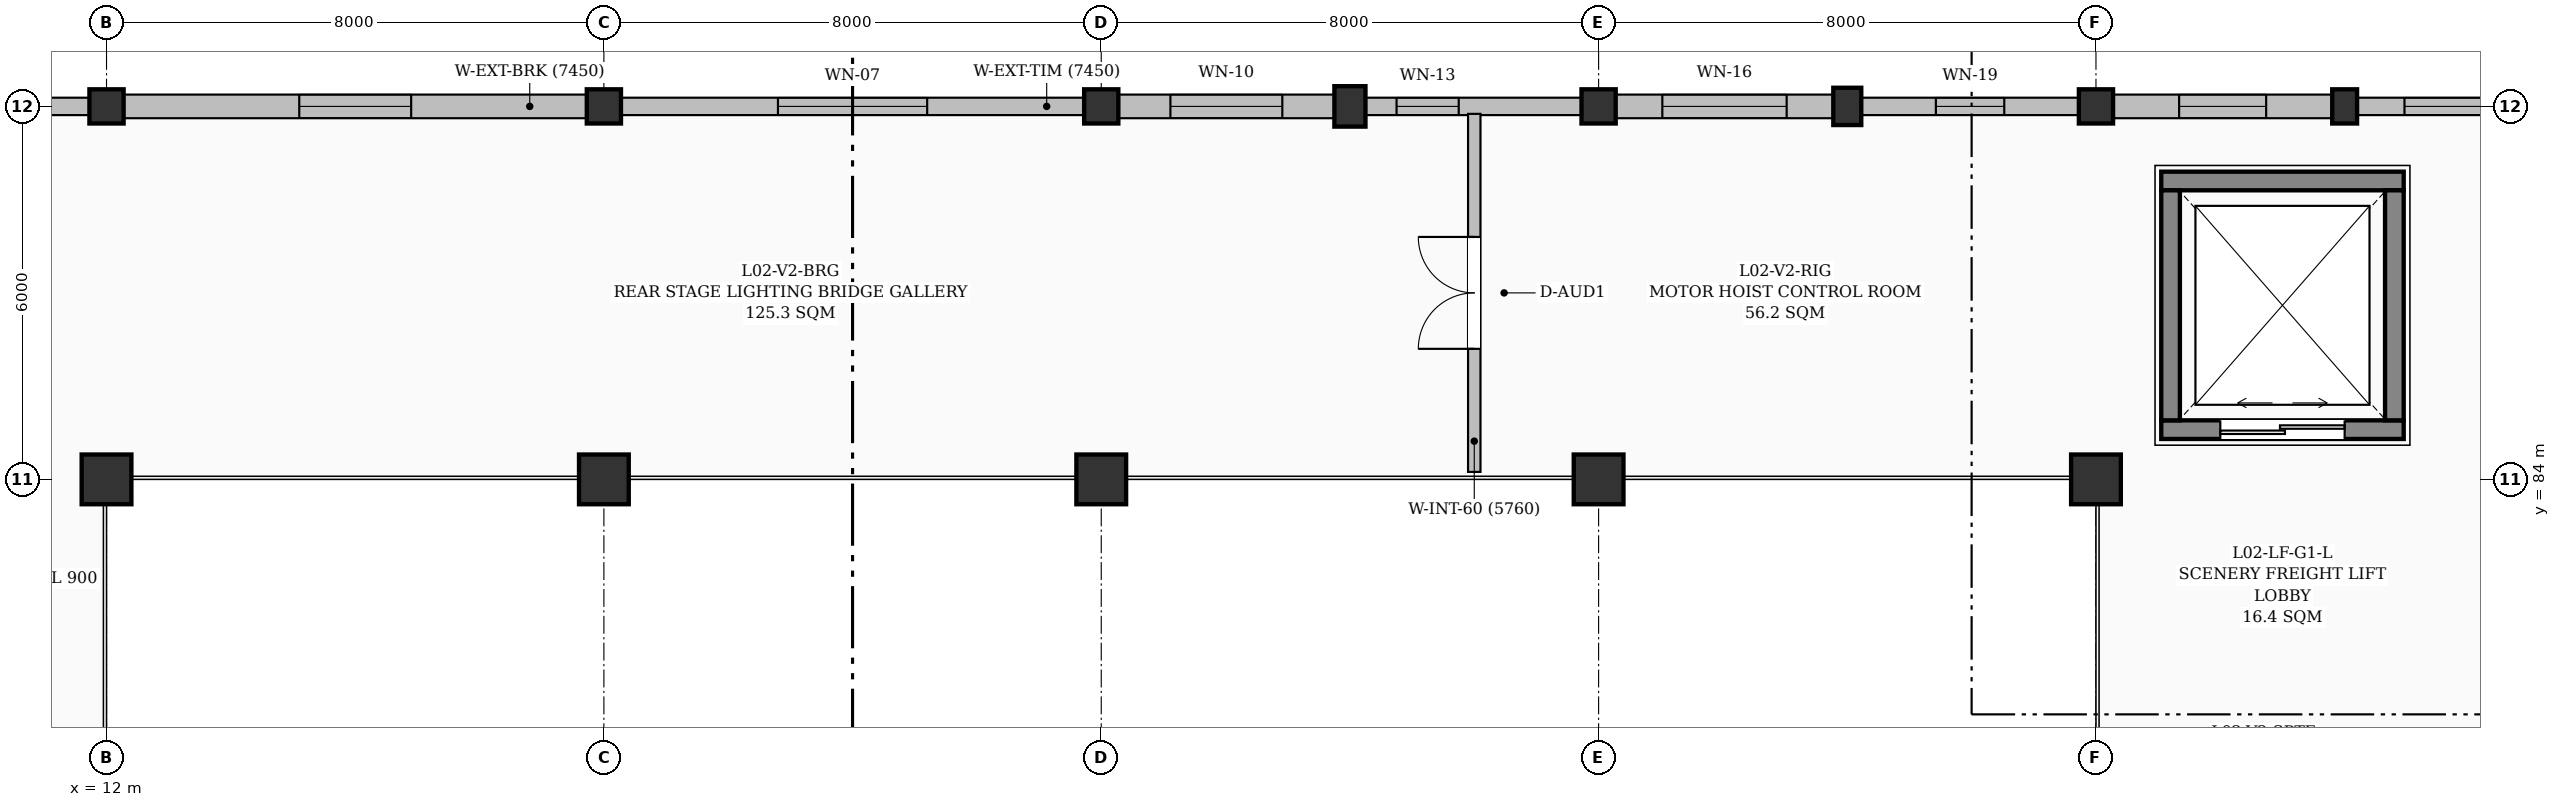
"""IFC4 building model, lengths in metres.
Left out: names, types, materials, properties, quantities, classifications, styles, units other than length and angle.
Written with IfcOpenShell. Run it as: python <this file> out.ifc"""

import sys

from ifc_helpers import new_model, si_unit, direction, frame, frame_2d, origin, origin_2d, place, context, subcontext, project, spatial, rectangle, extrude, element, fill, save


model = new_model("IFC4")
c1 = context("Model", 3, precision=1e-05, world=origin(), true_north=direction((0.0, 1.0)))
c2 = subcontext(c1, "Body", "Model", "MODEL_VIEW")
j1 = project(units=[si_unit("LENGTHUNIT", "METRE"), si_unit("PLANEANGLEUNIT", "RADIAN")], contexts=[c1])
p1 = place(None, origin())
s1 = spatial("IfcSite", under=j1, at=p1, CompositionType="ELEMENT")
p2 = place(p1, origin())
s2 = spatial("IfcBuilding", under=s1, at=p2, CompositionType="ELEMENT")
p3 = place(p2, frame((0.0, 0.0, 9.3)))
s3 = spatial("IfcBuildingStorey", under=s2, at=p3, CompositionType="ELEMENT", Elevation=9.3)
p4 = place(p3, frame((12.0, 84.0, 0.0), z_axis=(0.0, 0.0, 1.0), x_axis=(1.0, 0.0, 0.0)))
e1 = element("IfcColumn", 1, at=p4, inside=s3, PredefinedType="COLUMN", context=c2, shape_type="SweptSolid", body=[
    extrude(rectangle(XDim=0.8, YDim=0.8, at=origin_2d()), origin(), (0.0, 0.0, 1.0), 4.5),
])
p5 = place(p3, frame((12.0, 90.0, 0.0), z_axis=(0.0, 0.0, 1.0), x_axis=(1.0, 0.0, 0.0)))
e2 = element("IfcColumn", 2, at=p5, inside=s3, PredefinedType="COLUMN", context=c2, shape_type="SweptSolid", body=[
    extrude(rectangle(XDim=0.55, YDim=0.55, at=origin_2d()), origin(), (0.0, 0.0, 1.0), 4.5),
])
p6 = place(p3, frame((20.0, 84.0, 0.0), z_axis=(0.0, 0.0, 1.0), x_axis=(1.0, 0.0, 0.0)))
e3 = element("IfcColumn", 3, at=p6, inside=s3, PredefinedType="COLUMN", context=c2, shape_type="SweptSolid", body=[
    extrude(rectangle(XDim=0.8, YDim=0.8, at=origin_2d()), origin(), (0.0, 0.0, 1.0), 4.5),
])
p7 = place(p3, frame((20.0, 90.0, 0.0), z_axis=(0.0, 0.0, 1.0), x_axis=(1.0, 0.0, 0.0)))
e4 = element("IfcColumn", 4, at=p7, inside=s3, PredefinedType="COLUMN", context=c2, shape_type="SweptSolid", body=[
    extrude(rectangle(XDim=0.55, YDim=0.55, at=origin_2d()), origin(), (0.0, 0.0, 1.0), 4.5),
])
p8 = place(p3, frame((28.0, 84.0, 0.0), z_axis=(0.0, 0.0, 1.0), x_axis=(1.0, 0.0, 0.0)))
e5 = element("IfcColumn", 5, at=p8, inside=s3, PredefinedType="COLUMN", context=c2, shape_type="SweptSolid", body=[
    extrude(rectangle(XDim=0.8, YDim=0.8, at=origin_2d()), origin(), (0.0, 0.0, 1.0), 4.5),
])
p9 = place(p3, frame((28.0, 90.0, 0.0), z_axis=(0.0, 0.0, 1.0), x_axis=(1.0, 0.0, 0.0)))
e6 = element("IfcColumn", 6, at=p9, inside=s3, PredefinedType="COLUMN", context=c2, shape_type="SweptSolid", body=[
    extrude(rectangle(XDim=0.55, YDim=0.55, at=origin_2d()), origin(), (0.0, 0.0, 1.0), 4.5),
])
p10 = place(p3, frame((32.0, 90.0, 0.0), z_axis=(0.0, 0.0, 1.0), x_axis=(1.0, 0.0, 0.0)))
e7 = element("IfcColumn", 7, at=p10, inside=s3, PredefinedType="PILASTER", context=c2, shape_type="SweptSolid", body=[
    extrude(rectangle(XDim=0.5, YDim=0.65, at=origin_2d()), origin(), (0.0, 0.0, 1.0), 4.5),
])
p11 = place(p3, frame((36.0, 84.0, 0.0), z_axis=(0.0, 0.0, 1.0), x_axis=(1.0, 0.0, 0.0)))
e8 = element("IfcColumn", 8, at=p11, inside=s3, PredefinedType="COLUMN", context=c2, shape_type="SweptSolid", body=[
    extrude(rectangle(XDim=0.8, YDim=0.8, at=origin_2d()), origin(), (0.0, 0.0, 1.0), 4.5),
])
p12 = place(p3, frame((36.0, 90.0, 0.0), z_axis=(0.0, 0.0, 1.0), x_axis=(1.0, 0.0, 0.0)))
e9 = element("IfcColumn", 9, at=p12, inside=s3, PredefinedType="COLUMN", context=c2, shape_type="SweptSolid", body=[
    extrude(rectangle(XDim=0.55, YDim=0.55, at=origin_2d()), origin(), (0.0, 0.0, 1.0), 4.5),
])
p13 = place(p3, frame((40.0, 90.0, 0.0), z_axis=(0.0, 0.0, 1.0), x_axis=(1.0, 0.0, 0.0)))
e10 = element("IfcColumn", 10, at=p13, inside=s3, PredefinedType="PILASTER", context=c2, shape_type="SweptSolid", body=[
    extrude(rectangle(XDim=0.45, YDim=0.6, at=origin_2d()), origin(), (0.0, 0.0, 1.0), 4.5),
])
p14 = place(p3, frame((44.0, 84.0, 0.0), z_axis=(0.0, 0.0, 1.0), x_axis=(1.0, 0.0, 0.0)))
e11 = element("IfcColumn", 11, at=p14, inside=s3, PredefinedType="COLUMN", context=c2, shape_type="SweptSolid", body=[
    extrude(rectangle(XDim=0.8, YDim=0.8, at=origin_2d()), origin(), (0.0, 0.0, 1.0), 4.5),
])
p15 = place(p3, frame((44.0, 90.0, 0.0), z_axis=(0.0, 0.0, 1.0), x_axis=(1.0, 0.0, 0.0)))
e12 = element("IfcColumn", 12, at=p15, inside=s3, PredefinedType="COLUMN", context=c2, shape_type="SweptSolid", body=[
    extrude(rectangle(XDim=0.55, YDim=0.55, at=origin_2d()), origin(), (0.0, 0.0, 1.0), 4.5),
])
p16 = place(p3, frame((48.0, 90.0, 0.0), z_axis=(0.0, 0.0, 1.0), x_axis=(1.0, 0.0, 0.0)))
e13 = element("IfcColumn", 13, at=p16, inside=s3, PredefinedType="PILASTER", context=c2, shape_type="SweptSolid", body=[
    extrude(rectangle(XDim=0.4, YDim=0.55, at=origin_2d()), origin(), (0.0, 0.0, 1.0), 4.5),
])
p17 = place(p3, frame((8.25, 90.0, 0.0), z_axis=(0.0, 0.0, 1.0), x_axis=(1.0, 0.0, 0.0)))
e14 = element("IfcWall", 14, at=p17, inside=s3, PredefinedType="SOLIDWALL", context=c2, shape_type="SweptSolid", body=[
    extrude(rectangle(XDim=3.475, YDim=0.28, at=frame_2d((1.738, 0.0))), origin(), (0.0, 0.0, 1.0), 3.755),
])
p18 = place(p17, frame((1.137, 0.0, 0.95)))
e15 = element("IfcOpeningElement", 15, at=p18, cuts=e14, PredefinedType="OPENING", context=c2, shape_type="SweptSolid", body=[
    extrude(rectangle(XDim=1.2, YDim=1.8, at=frame_2d((0.6, 0.9))), frame((0.0, 0.15, 0.0), z_axis=(0.0, -1.0, 0.0), x_axis=(1.0, 0.0, 0.0)), (0.0, 0.0, 1.0), 0.3),
])
p19 = place(p3, frame((12.275, 90.0, 0.0), z_axis=(0.0, 0.0, 1.0), x_axis=(1.0, 0.0, 0.0)))
e16 = element("IfcWall", 16, at=p19, inside=s3, PredefinedType="SOLIDWALL", context=c2, shape_type="SweptSolid", body=[
    extrude(rectangle(XDim=7.45, YDim=0.38, at=frame_2d((3.725, 0.0))), origin(), (0.0, 0.0, 1.0), 3.705),
])
p20 = place(p19, frame((2.825, 0.0, 0.95)))
e17 = element("IfcOpeningElement", 17, at=p20, cuts=e16, PredefinedType="OPENING", context=c2, shape_type="SweptSolid", body=[
    extrude(rectangle(XDim=1.8, YDim=1.8, at=frame_2d((0.9, 0.9))), frame((0.0, 0.2, 0.0), z_axis=(0.0, -1.0, 0.0), x_axis=(1.0, 0.0, 0.0)), (0.0, 0.0, 1.0), 0.4),
])
p21 = place(p3, frame((20.275, 90.0, 0.0), z_axis=(0.0, 0.0, 1.0), x_axis=(1.0, 0.0, 0.0)))
e18 = element("IfcWall", 18, at=p21, inside=s3, PredefinedType="SOLIDWALL", context=c2, shape_type="SweptSolid", body=[
    extrude(rectangle(XDim=7.45, YDim=0.28, at=frame_2d((3.725, 0.0))), origin(), (0.0, 0.0, 1.0), 3.655),
])
p22 = place(p21, frame((2.525, 0.0, 0.95)))
e19 = element("IfcOpeningElement", 19, at=p22, cuts=e18, PredefinedType="OPENING", context=c2, shape_type="SweptSolid", body=[
    extrude(rectangle(XDim=2.4, YDim=1.8, at=frame_2d((1.2, 0.9))), frame((0.0, 0.15, 0.0), z_axis=(0.0, -1.0, 0.0), x_axis=(1.0, 0.0, 0.0)), (0.0, 0.0, 1.0), 0.3),
])
p23 = place(p3, frame((28.275, 90.0, 0.0), z_axis=(0.0, 0.0, 1.0), x_axis=(1.0, 0.0, 0.0)))
e20 = element("IfcWall", 20, at=p23, inside=s3, PredefinedType="SOLIDWALL", context=c2, shape_type="SweptSolid", body=[
    extrude(rectangle(XDim=3.475, YDim=0.38, at=frame_2d((1.738, 0.0))), origin(), (0.0, 0.0, 1.0), 3.955),
])
p24 = place(p23, frame((0.837, 0.0, 0.95)))
e21 = element("IfcOpeningElement", 21, at=p24, cuts=e20, PredefinedType="OPENING", context=c2, shape_type="SweptSolid", body=[
    extrude(rectangle(XDim=1.8, YDim=1.5, at=frame_2d((0.9, 0.75))), frame((0.0, 0.2, 0.0), z_axis=(0.0, -1.0, 0.0), x_axis=(1.0, 0.0, 0.0)), (0.0, 0.0, 1.0), 0.4),
])
p25 = place(p3, frame((32.25, 90.0, 0.0), z_axis=(0.0, 0.0, 1.0), x_axis=(1.0, 0.0, 0.0)))
e22 = element("IfcWall", 22, at=p25, inside=s3, PredefinedType="SOLIDWALL", context=c2, shape_type="SweptSolid", body=[
    extrude(rectangle(XDim=3.475, YDim=0.28, at=frame_2d((1.738, 0.0))), origin(), (0.0, 0.0, 1.0), 3.955),
])
p26 = place(p25, frame((0.5, 0.0, 0.95)))
e23 = element("IfcOpeningElement", 23, at=p26, cuts=e22, PredefinedType="OPENING", context=c2, shape_type="SweptSolid", body=[
    extrude(rectangle(XDim=1.0, YDim=1.4, at=frame_2d((0.5, 0.7))), frame((0.0, 0.15, 0.0), z_axis=(0.0, -1.0, 0.0), x_axis=(1.0, 0.0, 0.0)), (0.0, 0.0, 1.0), 0.3),
])
p27 = place(p3, frame((36.275, 90.0, 0.0), z_axis=(0.0, 0.0, 1.0), x_axis=(1.0, 0.0, 0.0)))
e24 = element("IfcWall", 24, at=p27, inside=s3, PredefinedType="SOLIDWALL", context=c2, shape_type="SweptSolid", body=[
    extrude(rectangle(XDim=3.5, YDim=0.38, at=frame_2d((1.75, 0.0))), origin(), (0.0, 0.0, 1.0), 3.755),
])
p28 = place(p27, frame((0.75, 0.0, 0.95)))
e25 = element("IfcOpeningElement", 25, at=p28, cuts=e24, PredefinedType="OPENING", context=c2, shape_type="SweptSolid", body=[
    extrude(rectangle(XDim=2.0, YDim=1.2, at=frame_2d((1.0, 0.6))), frame((0.0, 0.2, 0.0), z_axis=(0.0, -1.0, 0.0), x_axis=(1.0, 0.0, 0.0)), (0.0, 0.0, 1.0), 0.4),
])
p29 = place(p3, frame((40.225, 90.0, 0.0), z_axis=(0.0, 0.0, 1.0), x_axis=(1.0, 0.0, 0.0)))
e26 = element("IfcWall", 26, at=p29, inside=s3, PredefinedType="SOLIDWALL", context=c2, shape_type="SweptSolid", body=[
    extrude(rectangle(XDim=3.5, YDim=0.28, at=frame_2d((1.75, 0.0))), origin(), (0.0, 0.0, 1.0), 3.755),
])
p30 = place(p29, frame((1.2, 0.0, 0.95)))
e27 = element("IfcOpeningElement", 27, at=p30, cuts=e26, PredefinedType="OPENING", context=c2, shape_type="SweptSolid", body=[
    extrude(rectangle(XDim=1.1, YDim=2.0, at=frame_2d((0.55, 1.0))), frame((0.0, 0.15, 0.0), z_axis=(0.0, -1.0, 0.0), x_axis=(1.0, 0.0, 0.0)), (0.0, 0.0, 1.0), 0.3),
])
p31 = place(p3, frame((44.275, 90.0, 0.0), z_axis=(0.0, 0.0, 1.0), x_axis=(1.0, 0.0, 0.0)))
e28 = element("IfcWall", 28, at=p31, inside=s3, PredefinedType="SOLIDWALL", context=c2, shape_type="SweptSolid", body=[
    extrude(rectangle(XDim=3.525, YDim=0.38, at=frame_2d((1.763, 0.0))), origin(), (0.0, 0.0, 1.0), 4.27),
])
p32 = place(p31, frame((1.062, 0.0, 0.95)))
e29 = element("IfcOpeningElement", 29, at=p32, cuts=e28, PredefinedType="OPENING", context=c2, shape_type="SweptSolid", body=[
    extrude(rectangle(XDim=1.4, YDim=1.8, at=frame_2d((0.7, 0.9))), frame((0.0, 0.2, 0.0), z_axis=(0.0, -1.0, 0.0), x_axis=(1.0, 0.0, 0.0)), (0.0, 0.0, 1.0), 0.4),
])
p33 = place(p3, frame((48.2, 90.0, 0.0), z_axis=(0.0, 0.0, 1.0), x_axis=(1.0, 0.0, 0.0)))
e30 = element("IfcWall", 30, at=p33, inside=s3, PredefinedType="SOLIDWALL", context=c2, shape_type="SweptSolid", body=[
    extrude(rectangle(XDim=3.525, YDim=0.28, at=frame_2d((1.763, 0.0))), origin(), (0.0, 0.0, 1.0), 4.27),
])
p34 = place(p33, frame((0.762, 0.0, 0.95)))
e31 = element("IfcOpeningElement", 31, at=p34, cuts=e30, PredefinedType="OPENING", context=c2, shape_type="SweptSolid", body=[
    extrude(rectangle(XDim=2.0, YDim=1.8, at=frame_2d((1.0, 0.9))), frame((0.0, 0.15, 0.0), z_axis=(0.0, -1.0, 0.0), x_axis=(1.0, 0.0, 0.0)), (0.0, 0.0, 1.0), 0.3),
])
p35 = place(p3, frame((45.05, 84.8, 0.0), z_axis=(0.0, 0.0, 1.0), x_axis=(1.0, 0.0, 0.0)))
e32 = element("IfcWall", 32, at=p35, inside=s3, PredefinedType="SHEAR", context=c2, shape_type="SweptSolid", body=[
    extrude(rectangle(XDim=3.9, YDim=0.3, at=frame_2d((1.95, 0.0))), origin(), (0.0, 0.0, 1.0), 4.27),
])
p36 = place(p35, frame((0.95, 0.0, 0.0)))
e33 = element("IfcOpeningElement", 33, at=p36, cuts=e32, PredefinedType="OPENING", context=c2, shape_type="SweptSolid", body=[
    extrude(rectangle(XDim=2.0, YDim=2.4, at=frame_2d((1.0, 1.2))), frame((0.0, 0.16, 0.0), z_axis=(0.0, -1.0, 0.0), x_axis=(1.0, 0.0, 0.0)), (0.0, 0.0, 1.0), 0.32),
])
p37 = place(p3, frame((48.95, 88.8, 0.0), z_axis=(0.0, 0.0, 1.0), x_axis=(-1.0, 0.0, 0.0)))
e34 = element("IfcWall", 34, at=p37, inside=s3, PredefinedType="SHEAR", context=c2, shape_type="SweptSolid", body=[
    extrude(rectangle(XDim=3.9, YDim=0.3, at=frame_2d((1.95, 0.0))), origin(), (0.0, 0.0, 1.0), 4.27),
])
for number, where, z_axis, x_axis in (
    (35, (45.2, 84.95, 0.0), (0.0, 0.0, 1.0), (0.0, 1.0, 0.0)),
    (36, (48.8, 88.65, 0.0), (0.0, 0.0, 1.0), (0.0, -1.0, 0.0)),
):
    element("IfcWall", number, at=place(p3, frame(where, z_axis=z_axis, x_axis=x_axis)), inside=s3, PredefinedType="SHEAR", context=c2, shape_type="SweptSolid", body=[
        extrude(rectangle(XDim=3.7, YDim=0.3, at=frame_2d((1.85, 0.0))), origin(), (0.0, 0.0, 1.0), 4.27),
    ])
p38 = place(p3, frame((34.0, 84.12, 0.0), z_axis=(0.0, 0.0, 1.0), x_axis=(0.0, 1.0, 0.0)))
e37 = element("IfcWall", 37, at=p38, inside=s3, PredefinedType="PARTITIONING", context=c2, shape_type="SweptSolid", body=[
    extrude(rectangle(XDim=5.76, YDim=0.2, at=frame_2d((2.88, 0.0))), origin(), (0.0, 0.0, 1.0), 4.27),
])
p39 = place(p38, frame((1.98, 0.0, 0.0)))
e38 = element("IfcOpeningElement", 38, at=p39, cuts=e37, PredefinedType="OPENING", context=c2, shape_type="SweptSolid", body=[
    extrude(rectangle(XDim=1.8, YDim=2.35, at=frame_2d((0.9, 1.175))), frame((0.0, 0.11, 0.0), z_axis=(0.0, -1.0, 0.0), x_axis=(1.0, 0.0, 0.0)), (0.0, 0.0, 1.0), 0.22),
])
p40 = place(p20, origin())
e39 = element("IfcWindow", 39, at=p40, inside=s3, PartitioningType="DOUBLE_PANEL_VERTICAL", PredefinedType="WINDOW", context=c2, shape_type="SweptSolid", body=[
    extrude(rectangle(XDim=1.8, YDim=1.8, at=frame_2d((0.9, 0.9))), frame((0.0, 0.03, 0.0), z_axis=(0.0, -1.0, 0.0), x_axis=(1.0, 0.0, 0.0)), (0.0, 0.0, 1.0), 0.06),
])
fill(e17, e39)
p41 = place(p22, origin())
e40 = element("IfcWindow", 40, at=p41, inside=s3, PartitioningType="TRIPLE_PANEL_VERTICAL", PredefinedType="WINDOW", context=c2, shape_type="SweptSolid", body=[
    extrude(rectangle(XDim=2.4, YDim=1.8, at=frame_2d((1.2, 0.9))), frame((0.0, 0.03, 0.0), z_axis=(0.0, -1.0, 0.0), x_axis=(1.0, 0.0, 0.0)), (0.0, 0.0, 1.0), 0.06),
])
fill(e19, e40)
p42 = place(p24, origin())
e41 = element("IfcWindow", 41, at=p42, inside=s3, PartitioningType="DOUBLE_PANEL_VERTICAL", PredefinedType="WINDOW", context=c2, shape_type="SweptSolid", body=[
    extrude(rectangle(XDim=1.8, YDim=1.5, at=frame_2d((0.9, 0.75))), frame((0.0, 0.03, 0.0), z_axis=(0.0, -1.0, 0.0), x_axis=(1.0, 0.0, 0.0)), (0.0, 0.0, 1.0), 0.06),
])
fill(e21, e41)
p43 = place(p26, origin())
e42 = element("IfcWindow", 42, at=p43, inside=s3, PartitioningType="SINGLE_PANEL", PredefinedType="WINDOW", context=c2, shape_type="SweptSolid", body=[
    extrude(rectangle(XDim=1.0, YDim=1.4, at=frame_2d((0.5, 0.7))), frame((0.0, 0.03, 0.0), z_axis=(0.0, -1.0, 0.0), x_axis=(1.0, 0.0, 0.0)), (0.0, 0.0, 1.0), 0.06),
])
fill(e23, e42)
p44 = place(p28, origin())
e43 = element("IfcWindow", 43, at=p44, inside=s3, PartitioningType="DOUBLE_PANEL_HORIZONTAL", PredefinedType="WINDOW", context=c2, shape_type="SweptSolid", body=[
    extrude(rectangle(XDim=2.0, YDim=1.2, at=frame_2d((1.0, 0.6))), frame((0.0, 0.03, 0.0), z_axis=(0.0, -1.0, 0.0), x_axis=(1.0, 0.0, 0.0)), (0.0, 0.0, 1.0), 0.06),
])
fill(e25, e43)
p45 = place(p30, origin())
e44 = element("IfcWindow", 44, at=p45, inside=s3, PartitioningType="SINGLE_PANEL", PredefinedType="WINDOW", context=c2, shape_type="SweptSolid", body=[
    extrude(rectangle(XDim=1.1, YDim=2.0, at=frame_2d((0.55, 1.0))), frame((0.0, 0.03, 0.0), z_axis=(0.0, -1.0, 0.0), x_axis=(1.0, 0.0, 0.0)), (0.0, 0.0, 1.0), 0.06),
])
fill(e27, e44)
p46 = place(p32, origin())
e45 = element("IfcWindow", 45, at=p46, inside=s3, PartitioningType="DOUBLE_PANEL_VERTICAL", PredefinedType="WINDOW", context=c2, shape_type="SweptSolid", body=[
    extrude(rectangle(XDim=1.4, YDim=1.8, at=frame_2d((0.7, 0.9))), frame((0.0, 0.03, 0.0), z_axis=(0.0, -1.0, 0.0), x_axis=(1.0, 0.0, 0.0)), (0.0, 0.0, 1.0), 0.06),
])
fill(e29, e45)
p47 = place(p34, origin())
e46 = element("IfcWindow", 46, at=p47, inside=s3, PartitioningType="TRIPLE_PANEL_VERTICAL", PredefinedType="WINDOW", context=c2, shape_type="SweptSolid", body=[
    extrude(rectangle(XDim=2.0, YDim=1.8, at=frame_2d((1.0, 0.9))), frame((0.0, 0.03, 0.0), z_axis=(0.0, -1.0, 0.0), x_axis=(1.0, 0.0, 0.0)), (0.0, 0.0, 1.0), 0.06),
])
fill(e31, e46)
p48 = place(p36, origin())
e47 = element("IfcDoor", 47, at=p48, inside=s3, OperationType="DOUBLE_DOOR_SLIDING", PredefinedType="DOOR", context=c2, shape_type="SweptSolid", body=[
    extrude(rectangle(XDim=2.0, YDim=2.4, at=frame_2d((1.0, 1.2))), frame((0.0, 0.025, 0.0), z_axis=(0.0, -1.0, 0.0), x_axis=(1.0, 0.0, 0.0)), (0.0, 0.0, 1.0), 0.05),
])
fill(e33, e47)
p49 = place(p39, origin())
e48 = element("IfcDoor", 48, at=p49, inside=s3, OperationType="DOUBLE_DOOR_SINGLE_SWING", PredefinedType="DOOR", context=c2, shape_type="SweptSolid", body=[
    extrude(rectangle(XDim=1.8, YDim=2.35, at=frame_2d((0.9, 1.175))), frame((0.0, 0.025, 0.0), z_axis=(0.0, -1.0, 0.0), x_axis=(1.0, 0.0, 0.0)), (0.0, 0.0, 1.0), 0.05),
])
fill(e38, e48)
save(model, sys.argv[1])
